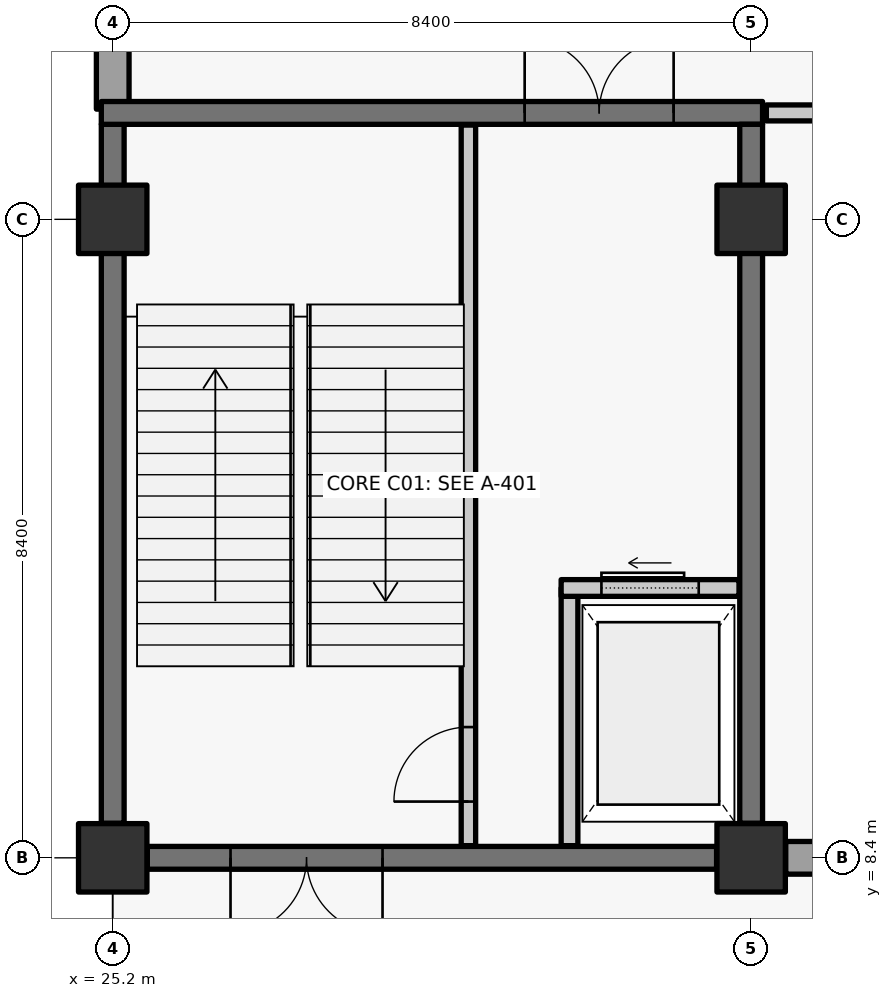
"""IFC4 building model, lengths in metres.
Left out: names, types, materials, properties, quantities, classifications, styles, units other than length and angle.
Written with IfcOpenShell. Run it as: python <this file> out.ifc"""

import sys

from ifc_helpers import new_model, si_unit, direction, frame, frame_2d, origin, origin_2d, place, context, subcontext, project, spatial, rectangle, extrude, element, fill, save


model = new_model("IFC4")
c1 = context("Model", 3, precision=1e-05, world=origin(), true_north=direction((0.0, 1.0)))
c2 = subcontext(c1, "Body", "Model", "MODEL_VIEW")
j1 = project(units=[si_unit("LENGTHUNIT", "METRE"), si_unit("PLANEANGLEUNIT", "RADIAN")], contexts=[c1])
p1 = place(None, origin())
s1 = spatial("IfcSite", under=j1, at=p1, CompositionType="ELEMENT")
p2 = place(p1, origin())
s2 = spatial("IfcBuilding", under=s1, at=p2, CompositionType="ELEMENT")
p3 = place(p2, origin())
s3 = spatial("IfcBuildingStorey", under=s2, at=p3, CompositionType="ELEMENT", Elevation=0.0)
for number, where, z_axis, x_axis in (
    (1, (25.2, 8.4, -0.36), (0.0, 0.0, 1.0), (1.0, 0.0, 0.0)),
    (2, (25.2, 16.8, -0.36), (0.0, 0.0, 1.0), (1.0, 0.0, 0.0)),
    (3, (33.6, 8.4, -0.36), (0.0, 0.0, 1.0), (1.0, 0.0, 0.0)),
    (4, (33.6, 16.8, -0.36), (0.0, 0.0, 1.0), (1.0, 0.0, 0.0)),
):
    element("IfcColumn", number, at=place(p3, frame(where, z_axis=z_axis, x_axis=x_axis)), inside=s3, PredefinedType="COLUMN", context=c2, shape_type="SweptSolid", body=[
        extrude(rectangle(XDim=0.9, YDim=0.9, at=origin_2d()), origin(), (0.0, 0.0, 1.0), 6.36),
    ])
p4 = place(p3, frame((41.545, 8.4, 0.0), z_axis=(0.0, 0.0, 1.0), x_axis=(-1.0, 0.0, 0.0)))
e5 = element("IfcWall", 5, at=p4, inside=s3, PredefinedType="SOLIDWALL", context=c2, shape_type="SweptSolid", body=[
    extrude(rectangle(XDim=7.49, YDim=0.43, at=frame_2d((3.745, 0.0))), origin(), (0.0, 0.0, 1.0), 5.13),
])
p5 = place(p4, frame((3.135, 0.0, 0.0)))
e6 = element("IfcOpeningElement", 6, at=p5, cuts=e5, PredefinedType="OPENING", context=c2, shape_type="SweptSolid", body=[
    extrude(rectangle(XDim=1.22, YDim=2.32, at=frame_2d((0.61, 1.16))), frame((0.0, 0.225, 0.0), z_axis=(0.0, -1.0, 0.0), x_axis=(1.0, 0.0, 0.0)), (0.0, 0.0, 1.0), 0.45),
])
p6 = place(p3, frame((25.2, 18.25, 0.0), z_axis=(0.0, 0.0, 1.0), x_axis=(0.0, 1.0, 0.0)))
e7 = element("IfcWall", 7, at=p6, inside=s3, PredefinedType="SOLIDWALL", context=c2, shape_type="SweptSolid", body=[
    extrude(rectangle(XDim=6.495, YDim=0.43, at=frame_2d((3.248, 0.0))), origin(), (0.0, 0.0, 1.0), 5.72),
])
p7 = place(p6, frame((2.275, 0.0, 0.95)))
e8 = element("IfcOpeningElement", 8, at=p7, cuts=e7, PredefinedType="OPENING", context=c2, shape_type="SweptSolid", body=[
    extrude(rectangle(XDim=1.95, YDim=2.05, at=frame_2d((0.975, 1.025))), frame((0.0, 0.225, 0.0), z_axis=(0.0, -1.0, 0.0), x_axis=(1.0, 0.0, 0.0)), (0.0, 0.0, 1.0), 0.45),
])
p8 = place(p3, frame((33.145, 8.4, -0.36), z_axis=(0.0, 0.0, 1.0), x_axis=(-1.0, 0.0, 0.0)))
e9 = element("IfcWall", 9, at=p8, inside=s3, PredefinedType="SHEAR", context=c2, shape_type="SweptSolid", body=[
    extrude(rectangle(XDim=7.49, YDim=0.3, at=frame_2d((3.745, 0.0))), origin(), (0.0, 0.0, 1.0), 6.08),
])
p9 = place(p8, frame((4.395, 0.0, 0.36)))
e10 = element("IfcOpeningElement", 10, at=p9, cuts=e9, PredefinedType="OPENING", context=c2, shape_type="SweptSolid", body=[
    extrude(rectangle(XDim=2.0, YDim=2.28, at=frame_2d((1.0, 1.14))), frame((0.0, 0.16, 0.0), z_axis=(0.0, -1.0, 0.0), x_axis=(1.0, 0.0, 0.0)), (0.0, 0.0, 1.0), 0.32),
])
p10 = place(p3, frame((25.2, 8.855, -0.36), z_axis=(0.0, 0.0, 1.0), x_axis=(0.0, 1.0, 0.0)))
e11 = element("IfcWall", 11, at=p10, inside=s3, PredefinedType="SHEAR", context=c2, shape_type="SweptSolid", body=[
    extrude(rectangle(XDim=9.195, YDim=0.3, at=frame_2d((4.598, 0.0))), origin(), (0.0, 0.0, 1.0), 6.08),
])
p11 = place(p3, frame((25.05, 18.2, -0.36), z_axis=(0.0, 0.0, 1.0), x_axis=(1.0, 0.0, 0.0)))
e12 = element("IfcWall", 12, at=p11, inside=s3, PredefinedType="SHEAR", context=c2, shape_type="SweptSolid", body=[
    extrude(rectangle(XDim=8.7, YDim=0.3, at=frame_2d((4.35, 0.0))), origin(), (0.0, 0.0, 1.0), 6.08),
])
p12 = place(p11, frame((5.57, 0.0, 0.36)))
e13 = element("IfcOpeningElement", 13, at=p12, cuts=e12, PredefinedType="OPENING", context=c2, shape_type="SweptSolid", body=[
    extrude(rectangle(XDim=1.96, YDim=2.2, at=frame_2d((0.98, 1.1))), frame((0.0, 0.16, 0.0), z_axis=(0.0, -1.0, 0.0), x_axis=(1.0, 0.0, 0.0)), (0.0, 0.0, 1.0), 0.32),
])
p13 = place(p3, frame((33.6, 18.05, -0.36), z_axis=(0.0, 0.0, 1.0), x_axis=(0.0, -1.0, 0.0)))
e14 = element("IfcWall", 14, at=p13, inside=s3, PredefinedType="SHEAR", context=c2, shape_type="SweptSolid", body=[
    extrude(rectangle(XDim=9.195, YDim=0.3, at=frame_2d((4.598, 0.0))), origin(), (0.0, 0.0, 1.0), 6.08),
])
p14 = place(p3, frame((29.88, 8.56, -0.36), z_axis=(0.0, 0.0, 1.0), x_axis=(0.0, 1.0, 0.0)))
e15 = element("IfcWall", 15, at=p14, inside=s3, PredefinedType="SOLIDWALL", context=c2, shape_type="SweptSolid", body=[
    extrude(rectangle(XDim=9.48, YDim=0.19, at=frame_2d((4.74, 0.0))), origin(), (0.0, 0.0, 1.0), 6.08),
])
p15 = place(p14, frame((0.58, 0.0, 0.36)))
e16 = element("IfcOpeningElement", 16, at=p15, cuts=e15, PredefinedType="OPENING", context=c2, shape_type="SweptSolid", body=[
    extrude(rectangle(XDim=0.98, YDim=2.15, at=frame_2d((0.49, 1.075))), frame((0.0, 0.105, 0.0), z_axis=(0.0, -1.0, 0.0), x_axis=(1.0, 0.0, 0.0)), (0.0, 0.0, 1.0), 0.21),
])
p16 = place(p3, frame((31.21, 8.56, 0.0), z_axis=(0.0, 0.0, 1.0), x_axis=(0.0, 1.0, 0.0)))
e17 = element("IfcWall", 17, at=p16, inside=s3, PredefinedType="SOLIDWALL", context=c2, shape_type="SweptSolid", body=[
    extrude(rectangle(XDim=3.39, YDim=0.22, at=frame_2d((1.695, 0.0))), origin(), (0.0, 0.0, 1.0), 5.72),
])
p17 = place(p3, frame((31.1, 11.95, 0.0), z_axis=(0.0, 0.0, 1.0), x_axis=(1.0, 0.0, 0.0)))
e18 = element("IfcWall", 18, at=p17, inside=s3, PredefinedType="SOLIDWALL", context=c2, shape_type="SweptSolid", body=[
    extrude(rectangle(XDim=2.34, YDim=0.22, at=frame_2d((1.17, 0.0))), origin(), (0.0, 0.0, 1.0), 5.72),
])
p18 = place(p17, frame((0.53, 0.0, 0.0)))
e19 = element("IfcOpeningElement", 19, at=p18, cuts=e18, PredefinedType="OPENING", context=c2, shape_type="SweptSolid", body=[
    extrude(rectangle(XDim=1.28, YDim=2.25, at=frame_2d((0.64, 1.125))), frame((0.0, 0.12, 0.0), z_axis=(0.0, -1.0, 0.0), x_axis=(1.0, 0.0, 0.0)), (0.0, 0.0, 1.0), 0.24),
])
p19 = place(p3, frame((33.8, 18.2, 0.0), z_axis=(0.0, 0.0, 1.0), x_axis=(1.0, 0.0, 0.0)))
e20 = element("IfcWall", 20, at=p19, inside=s3, PredefinedType="PARTITIONING", context=c2, shape_type="SweptSolid", body=[
    extrude(rectangle(XDim=33.2, YDim=0.21, at=frame_2d((16.6, 0.0))), origin(), (0.0, 0.0, 1.0), 5.72),
])
p20 = place(p19, frame((3.41, 0.0, 0.0)))
e21 = element("IfcOpeningElement", 21, at=p20, cuts=e20, PredefinedType="OPENING", context=c2, shape_type="SweptSolid", body=[
    extrude(rectangle(XDim=1.18, YDim=2.16, at=frame_2d((0.59, 1.08))), frame((0.0, 0.115, 0.0), z_axis=(0.0, -1.0, 0.0), x_axis=(1.0, 0.0, 0.0)), (0.0, 0.0, 1.0), 0.23),
])
p21 = place(p19, frame((20.21, 0.0, 0.0)))
e22 = element("IfcOpeningElement", 22, at=p21, cuts=e20, PredefinedType="OPENING", context=c2, shape_type="SweptSolid", body=[
    extrude(rectangle(XDim=1.18, YDim=2.16, at=frame_2d((0.59, 1.08))), frame((0.0, 0.115, 0.0), z_axis=(0.0, -1.0, 0.0), x_axis=(1.0, 0.0, 0.0)), (0.0, 0.0, 1.0), 0.23),
])
p22 = place(p15, origin())
e23 = element("IfcDoor", 23, at=p22, inside=s3, OperationType="SINGLE_SWING_LEFT", PredefinedType="DOOR", context=c2, shape_type="SweptSolid", body=[
    extrude(rectangle(XDim=0.98, YDim=2.15, at=frame_2d((0.49, 1.075))), frame((0.0, 0.025, 0.0), z_axis=(0.0, -1.0, 0.0), x_axis=(1.0, 0.0, 0.0)), (0.0, 0.0, 1.0), 0.05),
])
fill(e16, e23)
p23 = place(p12, origin())
e24 = element("IfcDoor", 24, at=p23, inside=s3, OperationType="DOUBLE_DOOR_SINGLE_SWING", PredefinedType="DOOR", context=c2, shape_type="SweptSolid", body=[
    extrude(rectangle(XDim=1.96, YDim=2.2, at=frame_2d((0.98, 1.1))), frame((0.0, 0.025, 0.0), z_axis=(0.0, -1.0, 0.0), x_axis=(1.0, 0.0, 0.0)), (0.0, 0.0, 1.0), 0.05),
])
fill(e13, e24)
p24 = place(p9, origin())
e25 = element("IfcDoor", 25, at=p24, inside=s3, OperationType="DOUBLE_DOOR_SINGLE_SWING", PredefinedType="DOOR", context=c2, shape_type="SweptSolid", body=[
    extrude(rectangle(XDim=2.0, YDim=2.28, at=frame_2d((1.0, 1.14))), frame((0.0, 0.025, 0.0), z_axis=(0.0, -1.0, 0.0), x_axis=(1.0, 0.0, 0.0)), (0.0, 0.0, 1.0), 0.05),
])
fill(e10, e25)
p25 = place(p18, origin())
e26 = element("IfcDoor", 26, at=p25, inside=s3, OperationType="SLIDING_TO_LEFT", PredefinedType="DOOR", context=c2, shape_type="SweptSolid", body=[
    extrude(rectangle(XDim=1.28, YDim=2.25, at=frame_2d((0.64, 1.125))), frame((0.0, 0.025, 0.0), z_axis=(0.0, -1.0, 0.0), x_axis=(1.0, 0.0, 0.0)), (0.0, 0.0, 1.0), 0.05),
])
fill(e19, e26)
save(model, sys.argv[1])
